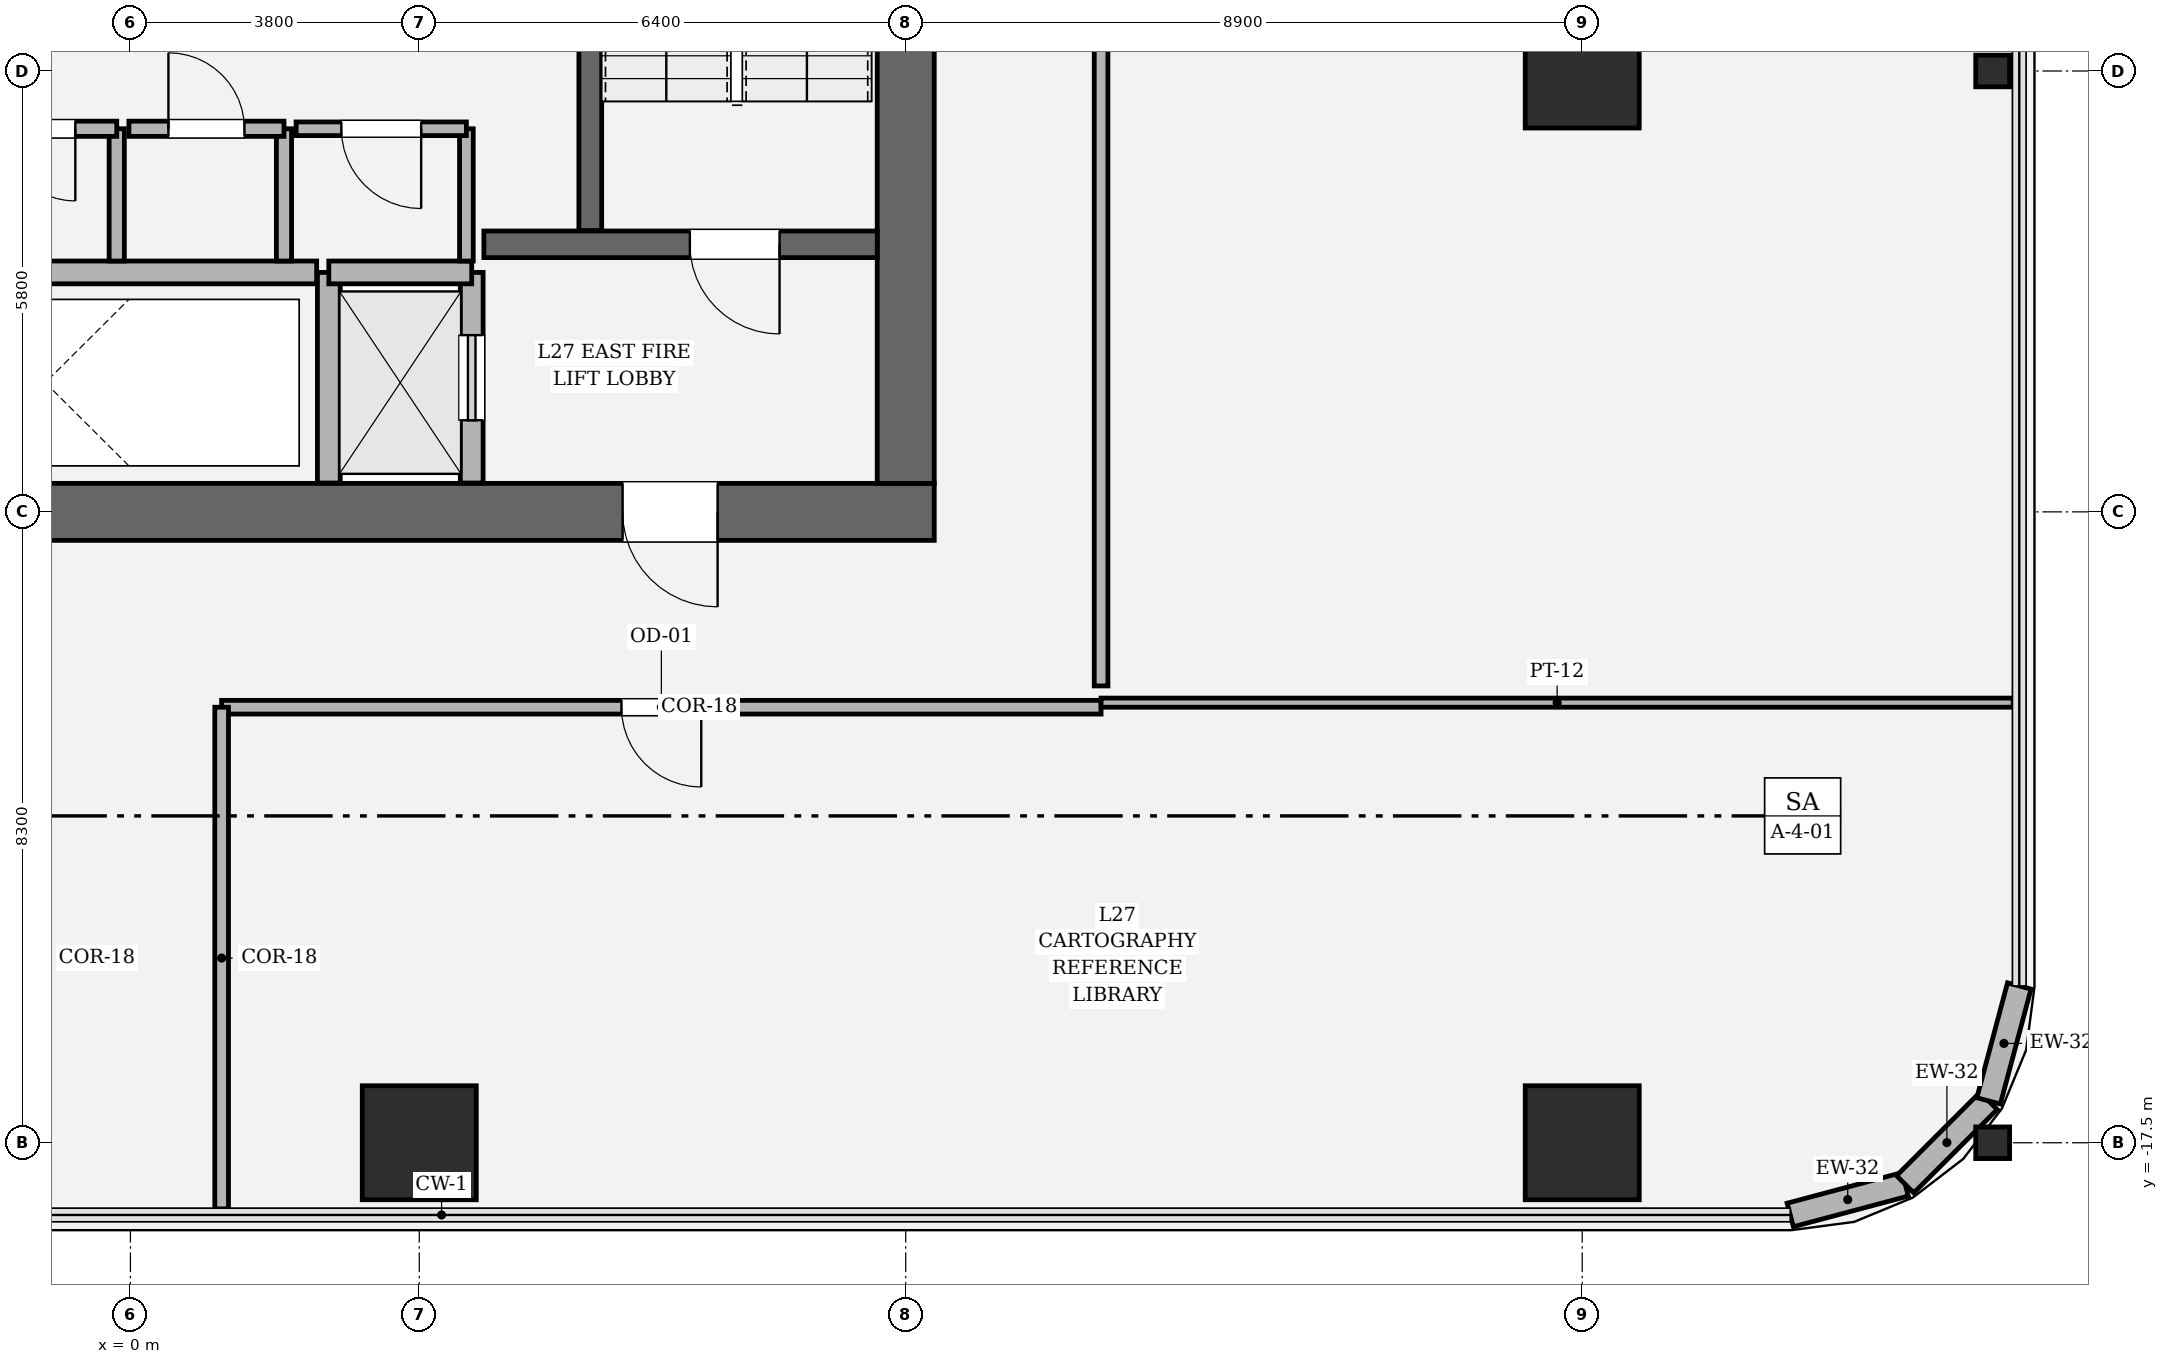
"""IFC4 building model, lengths in metres.
Left out: names, types, materials, properties, quantities, classifications, styles, units other than length and angle.
Written with IfcOpenShell. Run it as: python <this file> out.ifc"""

import sys

from ifc_helpers import new_model, si_unit, direction, frame, frame_2d, origin, origin_2d, place, context, subcontext, project, spatial, rectangle, hollow_rectangle, i_section, extrude, element, fill, save


model = new_model("IFC4")
c1 = context("Model", 3, precision=1e-05, world=origin(), true_north=direction((0.0, 1.0)))
c2 = subcontext(c1, "Body", "Model", "MODEL_VIEW")
j1 = project(units=[si_unit("LENGTHUNIT", "METRE"), si_unit("PLANEANGLEUNIT", "RADIAN")], contexts=[c1])
p1 = place(None, origin())
s1 = spatial("IfcSite", under=j1, at=p1, CompositionType="ELEMENT")
p2 = place(p1, origin())
s2 = spatial("IfcBuilding", under=s1, at=p2, CompositionType="ELEMENT")
p3 = place(p2, frame((0.0, 0.0, 117.3)))
s3 = spatial("IfcBuildingStorey", under=s2, at=p3, CompositionType="ELEMENT", Elevation=117.3)
p4 = place(p3, frame((10.575, -9.2, 0.0), z_axis=(0.0, 0.0, 1.0), x_axis=(-1.0, 0.0, 0.0)))
e1 = element("IfcWall", 1, at=p4, inside=s3, PredefinedType="SHEAR", context=c2, shape_type="SweptSolid", body=[
    extrude(rectangle(XDim=21.15, YDim=0.75, at=frame_2d((10.575, 0.0))), origin(), (0.0, 0.0, 1.0), 4.05),
])
p5 = place(p4, frame((2.85, 0.0, 0.0)))
e2 = element("IfcOpeningElement", 2, at=p5, cuts=e1, PredefinedType="OPENING", context=c2, shape_type="SweptSolid", body=[
    extrude(rectangle(XDim=1.25, YDim=2.25, at=frame_2d((0.625, 1.125))), frame((0.0, 0.385, 0.0), z_axis=(0.0, -1.0, 0.0), x_axis=(1.0, 0.0, 0.0)), (0.0, 0.0, 1.0), 0.77),
])
p6 = place(p4, frame((17.05, 0.0, 0.0)))
e3 = element("IfcOpeningElement", 3, at=p6, cuts=e1, PredefinedType="OPENING", context=c2, shape_type="SweptSolid", body=[
    extrude(rectangle(XDim=1.25, YDim=2.25, at=frame_2d((0.625, 1.125))), frame((0.0, 0.385, 0.0), z_axis=(0.0, -1.0, 0.0), x_axis=(1.0, 0.0, 0.0)), (0.0, 0.0, 1.0), 0.77),
])
p7 = place(p3, frame((10.2, 8.825, 0.0), z_axis=(0.0, 0.0, 1.0), x_axis=(0.0, -1.0, 0.0)))
e4 = element("IfcWall", 4, at=p7, inside=s3, PredefinedType="SHEAR", context=c2, shape_type="SweptSolid", body=[
    extrude(rectangle(XDim=17.65, YDim=0.75, at=frame_2d((8.825, 0.0))), origin(), (0.0, 0.0, 1.0), 4.05),
])
p8 = place(p7, frame((3.855, 0.0, 0.0)))
e5 = element("IfcOpeningElement", 5, at=p8, cuts=e4, PredefinedType="OPENING", context=c2, shape_type="SweptSolid", body=[
    extrude(rectangle(XDim=1.18, YDim=2.2, at=frame_2d((0.59, 1.1))), frame((0.0, 0.385, 0.0), z_axis=(0.0, -1.0, 0.0), x_axis=(1.0, 0.0, 0.0)), (0.0, 0.0, 1.0), 0.77),
])
p9 = place(p3, frame((6.05, 3.45, 0.0), z_axis=(0.0, 0.0, 1.0), x_axis=(0.0, -1.0, 0.0)))
e6 = element("IfcWall", 6, at=p9, inside=s3, PredefinedType="SOLIDWALL", context=c2, shape_type="SweptSolid", body=[
    extrude(rectangle(XDim=8.95, YDim=0.3, at=frame_2d((4.475, 0.0))), origin(), (0.0, 0.0, 1.0), 4.05),
])
p10 = place(p3, frame((4.65, -5.68, 0.0), z_axis=(0.0, 0.0, 1.0), x_axis=(1.0, 0.0, 0.0)))
e7 = element("IfcWall", 7, at=p10, inside=s3, PredefinedType="SOLIDWALL", context=c2, shape_type="SweptSolid", body=[
    extrude(rectangle(XDim=5.175, YDim=0.35, at=frame_2d((2.587, 0.0))), origin(), (0.0, 0.0, 1.0), 4.05),
])
p11 = place(p10, frame((2.71, 0.0, 0.0)))
e8 = element("IfcOpeningElement", 8, at=p11, cuts=e7, PredefinedType="OPENING", context=c2, shape_type="SweptSolid", body=[
    extrude(rectangle(XDim=1.18, YDim=2.2, at=frame_2d((0.59, 1.1))), frame((0.0, 0.185, 0.0), z_axis=(0.0, -1.0, 0.0), x_axis=(1.0, 0.0, 0.0)), (0.0, 0.0, 1.0), 0.37),
])
for number, where, z_axis, x_axis in (
    (9, (3.8, -17.5, 0.0), (0.0, 0.0, 1.0), (1.0, 0.0, 0.0)),
    (10, (19.1, -17.5, 0.0), (0.0, 0.0, 1.0), (1.0, 0.0, 0.0)),
    (11, (19.1, -3.4, 0.0), (0.0, 0.0, 1.0), (1.0, 0.0, 0.0)),
):
    element("IfcColumn", number, at=place(p3, frame(where, z_axis=z_axis, x_axis=x_axis)), inside=s3, PredefinedType="COLUMN", context=c2, shape_type="SweptSolid", body=[
        extrude(hollow_rectangle(XDim=1.5, YDim=1.5, WallThickness=0.045, at=origin_2d()), origin(), (0.0, 0.0, 1.0), 4.05),
    ])
for number, where, z_axis, x_axis in (
    (12, (24.5, -17.5, 0.0), (0.0, 0.0, 1.0), (0.0, 1.0, 0.0)),
    (13, (24.5, -3.4, 0.0), (0.0, 0.0, 1.0), (0.0, 1.0, 0.0)),
):
    element("IfcColumn", number, at=place(p3, frame(where, z_axis=z_axis, x_axis=x_axis)), inside=s3, PredefinedType="COLUMN", context=c2, shape_type="SweptSolid", body=[
        extrude(i_section(OverallWidth=0.416, OverallDepth=0.446, WebThickness=0.039, FlangeThickness=0.062, FilletRadius=0.018, at=origin_2d()), origin(), (0.0, 0.0, 1.0), 4.048),
    ])
p12 = place(p3, frame((21.837, -18.45, 0.0), z_axis=(0.0, 0.0, 1.0), x_axis=(0.966224582397, 0.257701486942, 0.0)))
e14 = element("IfcWall", 14, at=p12, inside=s3, PredefinedType="SOLIDWALL", context=c2, shape_type="SweptSolid", body=[
    extrude(rectangle(XDim=1.565, YDim=0.32, at=frame_2d((0.783, 0.0))), origin(), (0.0, 0.0, 1.0), 3.81),
])
p13 = place(p3, frame((23.349, -18.047, 0.0), z_axis=(0.0, 0.0, 1.0), x_axis=(0.707106781187, 0.707106781187, 0.0)))
e15 = element("IfcWall", 15, at=p13, inside=s3, PredefinedType="SOLIDWALL", context=c2, shape_type="SweptSolid", body=[
    extrude(rectangle(XDim=1.552, YDim=0.32, at=frame_2d((0.776, 0.0))), origin(), (0.0, 0.0, 1.0), 2.484),
])
p14 = place(p3, frame((24.447, -16.949, 0.0), z_axis=(0.0, 0.0, 1.0), x_axis=(0.257847112249, 0.966185730957, 0.0)))
e16 = element("IfcWall", 16, at=p14, inside=s3, PredefinedType="SOLIDWALL", context=c2, shape_type="SweptSolid", body=[
    extrude(rectangle(XDim=1.565, YDim=0.32, at=frame_2d((0.783, 0.0))), origin(), (0.0, 0.0, 1.0), 2.524),
])
p15 = place(p3, frame((4.49, -8.82, 0.0), z_axis=(0.0, 0.0, 1.0), x_axis=(0.0, 1.0, 0.0)))
e17 = element("IfcWall", 17, at=p15, inside=s3, PredefinedType="SOLIDWALL", context=c2, shape_type="SweptSolid", body=[
    extrude(rectangle(XDim=2.77, YDim=0.3, at=frame_2d((1.385, 0.0))), origin(), (0.0, 0.0, 1.0), 3.81),
])
p16 = place(p15, frame((0.825, 0.0, 0.0)))
e18 = element("IfcOpeningElement", 18, at=p16, cuts=e17, PredefinedType="OPENING", context=c2, shape_type="SweptSolid", body=[
    extrude(rectangle(XDim=1.12, YDim=2.25, at=frame_2d((0.56, 1.125))), frame((0.0, 0.16, 0.0), z_axis=(0.0, -1.0, 0.0), x_axis=(1.0, 0.0, 0.0)), (0.0, 0.0, 1.0), 0.32),
])
p17 = place(p3, frame((2.61, -8.82, 0.0), z_axis=(0.0, 0.0, 1.0), x_axis=(0.0, 1.0, 0.0)))
e19 = element("IfcWall", 19, at=p17, inside=s3, PredefinedType="SOLIDWALL", context=c2, shape_type="SweptSolid", body=[
    extrude(rectangle(XDim=2.77, YDim=0.3, at=frame_2d((1.385, 0.0))), origin(), (0.0, 0.0, 1.0), 3.81),
])
p18 = place(p3, frame((2.61, -6.05, 0.0), z_axis=(0.0, 0.0, 1.0), x_axis=(1.0, 0.0, 0.0)))
e20 = element("IfcWall", 20, at=p18, inside=s3, PredefinedType="SOLIDWALL", context=c2, shape_type="SweptSolid", body=[
    extrude(rectangle(XDim=1.88, YDim=0.3, at=frame_2d((0.94, 0.0))), origin(), (0.0, 0.0, 1.0), 3.81),
])
p19 = place(p3, frame((-2.45, -6.05, 0.0), z_axis=(0.0, 0.0, 1.0), x_axis=(1.0, 0.0, 0.0)))
e21 = element("IfcWall", 21, at=p19, inside=s3, PredefinedType="SOLIDWALL", context=c2, shape_type="SweptSolid", body=[
    extrude(rectangle(XDim=4.9, YDim=0.3, at=frame_2d((2.45, 0.0))), origin(), (0.0, 0.0, 1.0), 3.81),
])
p20 = place(p3, frame((-0.18, -5.9, 0.0), z_axis=(0.0, 0.0, 1.0), x_axis=(0.0, 1.0, 0.0)))
e22 = element("IfcWall", 22, at=p20, inside=s3, PredefinedType="SOLIDWALL", context=c2, shape_type="SweptSolid", body=[
    extrude(rectangle(XDim=1.74, YDim=0.2, at=frame_2d((0.87, 0.0))), origin(), (0.0, 0.0, 1.0), 3.81),
])
p21 = place(p3, frame((-0.18, -4.16, 0.0), z_axis=(0.0, 0.0, 1.0), x_axis=(-1.0, 0.0, 0.0)))
e23 = element("IfcWall", 23, at=p21, inside=s3, PredefinedType="SOLIDWALL", context=c2, shape_type="SweptSolid", body=[
    extrude(rectangle(XDim=2.04, YDim=0.2, at=frame_2d((1.02, 0.0))), origin(), (0.0, 0.0, 1.0), 3.81),
])
p22 = place(p21, frame((0.545, 0.0, 0.0)))
e24 = element("IfcOpeningElement", 24, at=p22, cuts=e23, PredefinedType="OPENING", context=c2, shape_type="SweptSolid", body=[
    extrude(rectangle(XDim=0.95, YDim=2.15, at=frame_2d((0.475, 1.075))), frame((0.0, 0.11, 0.0), z_axis=(0.0, -1.0, 0.0), x_axis=(1.0, 0.0, 0.0)), (0.0, 0.0, 1.0), 0.22),
])
p23 = place(p3, frame((2.02, -5.9, 0.0), z_axis=(0.0, 0.0, 1.0), x_axis=(0.0, 1.0, 0.0)))
e25 = element("IfcWall", 25, at=p23, inside=s3, PredefinedType="SOLIDWALL", context=c2, shape_type="SweptSolid", body=[
    extrude(rectangle(XDim=1.74, YDim=0.2, at=frame_2d((0.87, 0.0))), origin(), (0.0, 0.0, 1.0), 3.81),
])
p24 = place(p3, frame((2.02, -4.16, 0.0), z_axis=(0.0, 0.0, 1.0), x_axis=(-1.0, 0.0, 0.0)))
e26 = element("IfcWall", 26, at=p24, inside=s3, PredefinedType="SOLIDWALL", context=c2, shape_type="SweptSolid", body=[
    extrude(rectangle(XDim=2.04, YDim=0.2, at=frame_2d((1.02, 0.0))), origin(), (0.0, 0.0, 1.0), 3.81),
])
p25 = place(p24, frame((0.52, 0.0, 0.0)))
e27 = element("IfcOpeningElement", 27, at=p25, cuts=e26, PredefinedType="OPENING", context=c2, shape_type="SweptSolid", body=[
    extrude(rectangle(XDim=1.0, YDim=2.15, at=frame_2d((0.5, 1.075))), frame((0.0, 0.11, 0.0), z_axis=(0.0, -1.0, 0.0), x_axis=(1.0, 0.0, 0.0)), (0.0, 0.0, 1.0), 0.22),
])
p26 = place(p3, frame((4.42, -5.9, 0.0), z_axis=(0.0, 0.0, 1.0), x_axis=(0.0, 1.0, 0.0)))
e28 = element("IfcWall", 28, at=p26, inside=s3, PredefinedType="PARTITIONING", context=c2, shape_type="SweptSolid", body=[
    extrude(rectangle(XDim=1.74, YDim=0.18, at=frame_2d((0.87, 0.0))), origin(), (0.0, 0.0, 1.0), 3.81),
])
p27 = place(p3, frame((4.42, -4.16, 0.0), z_axis=(0.0, 0.0, 1.0), x_axis=(-1.0, 0.0, 0.0)))
e29 = element("IfcWall", 29, at=p27, inside=s3, PredefinedType="PARTITIONING", context=c2, shape_type="SweptSolid", body=[
    extrude(rectangle(XDim=2.24, YDim=0.18, at=frame_2d((1.12, 0.0))), origin(), (0.0, 0.0, 1.0), 3.81),
])
p28 = place(p27, frame((0.595, 0.0, 0.0)))
e30 = element("IfcOpeningElement", 30, at=p28, cuts=e29, PredefinedType="OPENING", context=c2, shape_type="SweptSolid", body=[
    extrude(rectangle(XDim=1.05, YDim=2.2, at=frame_2d((0.525, 1.1))), frame((0.0, 0.1, 0.0), z_axis=(0.0, -1.0, 0.0), x_axis=(1.0, 0.0, 0.0)), (0.0, 0.0, 1.0), 0.2),
])
p29 = place(p3, frame((1.2, -11.77, 0.0), z_axis=(0.0, 0.0, 1.0), x_axis=(1.0, 0.0, 0.0)))
e31 = element("IfcWall", 31, at=p29, inside=s3, PredefinedType="PARTITIONING", context=c2, shape_type="SweptSolid", body=[
    extrude(rectangle(XDim=11.57, YDim=0.18, at=frame_2d((5.785, 0.0))), origin(), (0.0, 0.0, 1.0), 3.104),
])
p30 = place(p29, frame((5.26, 0.0, 0.0)))
e32 = element("IfcOpeningElement", 32, at=p30, cuts=e31, PredefinedType="OPENING", context=c2, shape_type="SweptSolid", body=[
    extrude(rectangle(XDim=1.05, YDim=2.2, at=frame_2d((0.525, 1.1))), frame((0.0, 0.1, 0.0), z_axis=(0.0, -1.0, 0.0), x_axis=(1.0, 0.0, 0.0)), (0.0, 0.0, 1.0), 0.2),
])
p31 = place(p3, frame((12.77, -11.71, 0.0), z_axis=(0.0, 0.0, 1.0), x_axis=(1.0, 0.0, 0.0)))
e33 = element("IfcWall", 33, at=p31, inside=s3, PredefinedType="PARTITIONING", context=c2, shape_type="SweptSolid", body=[
    extrude(rectangle(XDim=12.0, YDim=0.12, at=frame_2d((6.0, 0.0))), origin(), (0.0, 0.0, 1.0), 2.524),
])
p32 = place(p3, frame((1.2, -18.37, 0.0), z_axis=(0.0, 0.0, 1.0), x_axis=(0.0, 1.0, 0.0)))
e34 = element("IfcWall", 34, at=p32, inside=s3, PredefinedType="PARTITIONING", context=c2, shape_type="SweptSolid", body=[
    extrude(rectangle(XDim=6.6, YDim=0.18, at=frame_2d((3.3, 0.0))), origin(), (0.0, 0.0, 1.0), 3.104),
])
p33 = place(p3, frame((12.77, -11.49, 0.0), z_axis=(0.0, 0.0, 1.0), x_axis=(0.0, 1.0, 0.0)))
e35 = element("IfcWall", 35, at=p33, inside=s3, PredefinedType="PARTITIONING", context=c2, shape_type="SweptSolid", body=[
    extrude(rectangle(XDim=23.26, YDim=0.18, at=frame_2d((11.63, 0.0))), origin(), (0.0, 0.0, 1.0), 3.104),
])
p34 = place(p33, frame((10.93, 0.0, 0.0)))
e36 = element("IfcOpeningElement", 36, at=p34, cuts=e35, PredefinedType="OPENING", context=c2, shape_type="SweptSolid", body=[
    extrude(rectangle(XDim=1.4, YDim=2.25, at=frame_2d((0.7, 1.125))), frame((0.0, 0.1, 0.0), z_axis=(0.0, -1.0, 0.0), x_axis=(1.0, 0.0, 0.0)), (0.0, 0.0, 1.0), 0.2),
])
p35 = place(p11, origin())
e37 = element("IfcDoor", 37, at=p35, inside=s3, OperationType="SINGLE_SWING_RIGHT", PredefinedType="DOOR", context=c2, shape_type="SweptSolid", body=[
    extrude(rectangle(XDim=1.18, YDim=2.2, at=frame_2d((0.59, 1.1))), frame((0.0, 0.025, 0.0), z_axis=(0.0, -1.0, 0.0), x_axis=(1.0, 0.0, 0.0)), (0.0, 0.0, 1.0), 0.05),
])
fill(e8, e37)
p36 = place(p5, origin())
e38 = element("IfcDoor", 38, at=p36, inside=s3, OperationType="SINGLE_SWING_LEFT", PredefinedType="DOOR", context=c2, shape_type="SweptSolid", body=[
    extrude(rectangle(XDim=1.25, YDim=2.25, at=frame_2d((0.625, 1.125))), frame((0.0, 0.025, 0.0), z_axis=(0.0, -1.0, 0.0), x_axis=(1.0, 0.0, 0.0)), (0.0, 0.0, 1.0), 0.05),
])
fill(e2, e38)
p37 = place(p16, origin())
e39 = element("IfcDoor", 39, at=p37, inside=s3, OperationType="SLIDING_TO_RIGHT", PredefinedType="DOOR", context=c2, shape_type="SweptSolid", body=[
    extrude(rectangle(XDim=1.12, YDim=2.25, at=frame_2d((0.56, 1.125))), frame((0.0, 0.025, 0.0), z_axis=(0.0, -1.0, 0.0), x_axis=(1.0, 0.0, 0.0)), (0.0, 0.0, 1.0), 0.05),
])
fill(e18, e39)
p38 = place(p22, origin())
e40 = element("IfcDoor", 40, at=p38, inside=s3, OperationType="SINGLE_SWING_LEFT", PredefinedType="DOOR", context=c2, shape_type="SweptSolid", body=[
    extrude(rectangle(XDim=0.95, YDim=2.15, at=frame_2d((0.475, 1.075))), frame((0.0, 0.025, 0.0), z_axis=(0.0, -1.0, 0.0), x_axis=(1.0, 0.0, 0.0)), (0.0, 0.0, 1.0), 0.05),
])
fill(e24, e40)
p39 = place(p25, origin())
e41 = element("IfcDoor", 41, at=p39, inside=s3, OperationType="SINGLE_SWING_RIGHT", PredefinedType="DOOR", context=c2, shape_type="SweptSolid", body=[
    extrude(rectangle(XDim=1.0, YDim=2.15, at=frame_2d((0.5, 1.075))), frame((0.0, 0.025, 0.0), z_axis=(0.0, -1.0, 0.0), x_axis=(1.0, 0.0, 0.0)), (0.0, 0.0, 1.0), 0.05),
])
fill(e27, e41)
p40 = place(p28, origin())
e42 = element("IfcDoor", 42, at=p40, inside=s3, OperationType="SINGLE_SWING_LEFT", PredefinedType="DOOR", context=c2, shape_type="SweptSolid", body=[
    extrude(rectangle(XDim=1.05, YDim=2.2, at=frame_2d((0.525, 1.1))), frame((0.0, 0.025, 0.0), z_axis=(0.0, -1.0, 0.0), x_axis=(1.0, 0.0, 0.0)), (0.0, 0.0, 1.0), 0.05),
])
fill(e30, e42)
p41 = place(p30, origin())
e43 = element("IfcDoor", 43, at=p41, inside=s3, OperationType="SINGLE_SWING_RIGHT", PredefinedType="DOOR", context=c2, shape_type="SweptSolid", body=[
    extrude(rectangle(XDim=1.05, YDim=2.2, at=frame_2d((0.525, 1.1))), frame((0.0, 0.025, 0.0), z_axis=(0.0, -1.0, 0.0), x_axis=(1.0, 0.0, 0.0)), (0.0, 0.0, 1.0), 0.05),
])
fill(e32, e43)
save(model, sys.argv[1])
